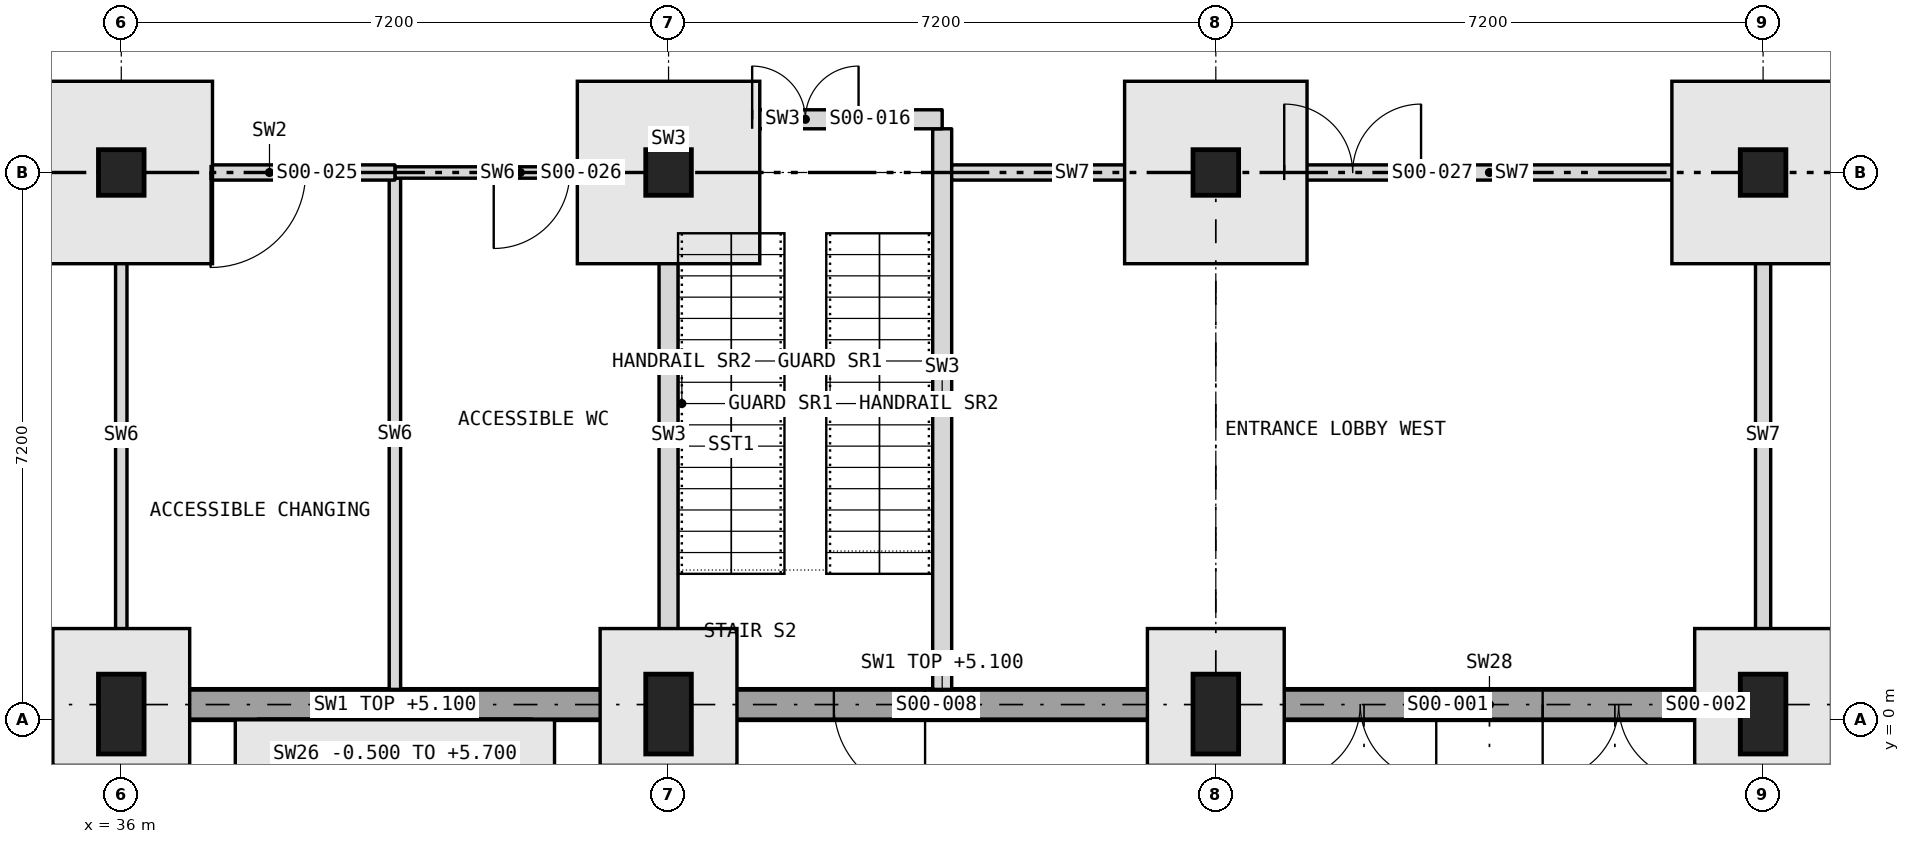
"""IFC4 building model, lengths in metres.
Left out: names, types, materials, properties, quantities, classifications, styles, units other than length and angle.
Written with IfcOpenShell. Run it as: python <this file> out.ifc"""

import sys

from ifc_helpers import new_model, si_unit, direction, frame, frame_2d, origin, origin_2d, place, context, subcontext, project, spatial, rectangle, extrude, element, fill, save


model = new_model("IFC4")
c1 = context("Model", 3, precision=1e-05, world=origin(), true_north=direction((0.0, 1.0)))
c2 = subcontext(c1, "Body", "Model", "MODEL_VIEW")
j1 = project(units=[si_unit("LENGTHUNIT", "METRE"), si_unit("PLANEANGLEUNIT", "RADIAN")], contexts=[c1])
p1 = place(None, origin())
s1 = spatial("IfcSite", under=j1, at=p1, CompositionType="ELEMENT")
p2 = place(p1, origin())
s2 = spatial("IfcBuilding", under=s1, at=p2, CompositionType="ELEMENT")
p3 = place(p2, origin())
s3 = spatial("IfcBuildingStorey", under=s2, at=p3, CompositionType="ELEMENT", Elevation=0.0)
p4 = place(p3, frame((36.0, 0.075, -0.45), z_axis=(0.0, 0.0, 1.0), x_axis=(1.0, 0.0, 0.0)))
e1 = element("IfcColumn", 1, at=p4, inside=s3, PredefinedType="COLUMN", context=c2, shape_type="SweptSolid", body=[
    extrude(rectangle(XDim=0.6, YDim=1.05, at=origin_2d()), origin(), (0.0, 0.0, 1.0), 6.45),
])
p5 = place(p3, frame((36.0, 7.2, -0.405), z_axis=(0.0, 0.0, 1.0), x_axis=(1.0, 0.0, 0.0)))
e2 = element("IfcColumn", 2, at=p5, inside=s3, PredefinedType="COLUMN", context=c2, shape_type="SweptSolid", body=[
    extrude(rectangle(XDim=0.6, YDim=0.6, at=origin_2d()), origin(), (0.0, 0.0, 1.0), 6.405),
])
p6 = place(p3, frame((43.2, 0.075, -0.45), z_axis=(0.0, 0.0, 1.0), x_axis=(1.0, 0.0, 0.0)))
e3 = element("IfcColumn", 3, at=p6, inside=s3, PredefinedType="COLUMN", context=c2, shape_type="SweptSolid", body=[
    extrude(rectangle(XDim=0.6, YDim=1.05, at=origin_2d()), origin(), (0.0, 0.0, 1.0), 6.45),
])
p7 = place(p3, frame((43.2, 7.2, -0.405), z_axis=(0.0, 0.0, 1.0), x_axis=(1.0, 0.0, 0.0)))
e4 = element("IfcColumn", 4, at=p7, inside=s3, PredefinedType="COLUMN", context=c2, shape_type="SweptSolid", body=[
    extrude(rectangle(XDim=0.6, YDim=0.6, at=origin_2d()), origin(), (0.0, 0.0, 1.0), 6.405),
])
p8 = place(p3, frame((50.4, 0.075, -0.45), z_axis=(0.0, 0.0, 1.0), x_axis=(1.0, 0.0, 0.0)))
e5 = element("IfcColumn", 5, at=p8, inside=s3, PredefinedType="COLUMN", context=c2, shape_type="SweptSolid", body=[
    extrude(rectangle(XDim=0.6, YDim=1.05, at=origin_2d()), origin(), (0.0, 0.0, 1.0), 6.45),
])
p9 = place(p3, frame((50.4, 7.2, -0.405), z_axis=(0.0, 0.0, 1.0), x_axis=(1.0, 0.0, 0.0)))
e6 = element("IfcColumn", 6, at=p9, inside=s3, PredefinedType="COLUMN", context=c2, shape_type="SweptSolid", body=[
    extrude(rectangle(XDim=0.6, YDim=0.6, at=origin_2d()), origin(), (0.0, 0.0, 1.0), 6.405),
])
p10 = place(p3, frame((57.6, 0.075, -0.45), z_axis=(0.0, 0.0, 1.0), x_axis=(1.0, 0.0, 0.0)))
e7 = element("IfcColumn", 7, at=p10, inside=s3, PredefinedType="COLUMN", context=c2, shape_type="SweptSolid", body=[
    extrude(rectangle(XDim=0.6, YDim=1.05, at=origin_2d()), origin(), (0.0, 0.0, 1.0), 6.45),
])
p11 = place(p3, frame((57.6, 7.2, -0.405), z_axis=(0.0, 0.0, 1.0), x_axis=(1.0, 0.0, 0.0)))
e8 = element("IfcColumn", 8, at=p11, inside=s3, PredefinedType="COLUMN", context=c2, shape_type="SweptSolid", body=[
    extrude(rectangle(XDim=0.6, YDim=0.6, at=origin_2d()), origin(), (0.0, 0.0, 1.0), 6.405),
])
p12 = place(p3, frame((29.1, 0.2, 0.0), z_axis=(0.0, 0.0, 1.0), x_axis=(1.0, 0.0, 0.0)))
e9 = element("IfcWall", 9, at=p12, inside=s3, PredefinedType="SOLIDWALL", context=c2, shape_type="SweptSolid", body=[
    extrude(rectangle(XDim=6.6, YDim=0.4, at=frame_2d((3.3, 0.0))), origin(), (0.0, 0.0, 1.0), 5.1),
])
p13 = place(p12, frame((1.9, 0.0, 2.4)))
e10 = element("IfcOpeningElement", 10, at=p13, cuts=e9, PredefinedType="OPENING", context=c2, shape_type="SweptSolid", body=[
    extrude(rectangle(XDim=1.1, YDim=1.2, at=frame_2d((0.55, 0.6))), frame((0.0, 0.21, 0.0), z_axis=(0.0, -1.0, 0.0), x_axis=(1.0, 0.0, 0.0)), (0.0, 0.0, 1.0), 0.42),
])
p14 = place(p12, frame((3.6, 0.0, 2.4)))
e11 = element("IfcOpeningElement", 11, at=p14, cuts=e9, PredefinedType="OPENING", context=c2, shape_type="SweptSolid", body=[
    extrude(rectangle(XDim=1.1, YDim=1.2, at=frame_2d((0.55, 0.6))), frame((0.0, 0.21, 0.0), z_axis=(0.0, -1.0, 0.0), x_axis=(1.0, 0.0, 0.0)), (0.0, 0.0, 1.0), 0.42),
])
p15 = place(p3, frame((36.3, 0.2, 0.0), z_axis=(0.0, 0.0, 1.0), x_axis=(1.0, 0.0, 0.0)))
e12 = element("IfcWall", 12, at=p15, inside=s3, PredefinedType="SOLIDWALL", context=c2, shape_type="SweptSolid", body=[
    extrude(rectangle(XDim=6.6, YDim=0.4, at=frame_2d((3.3, 0.0))), origin(), (0.0, 0.0, 1.0), 5.1),
])
p16 = place(p3, frame((43.5, 0.2, 0.0), z_axis=(0.0, 0.0, 1.0), x_axis=(1.0, 0.0, 0.0)))
e13 = element("IfcWall", 13, at=p16, inside=s3, PredefinedType="SOLIDWALL", context=c2, shape_type="SweptSolid", body=[
    extrude(rectangle(XDim=6.6, YDim=0.4, at=frame_2d((3.3, 0.0))), origin(), (0.0, 0.0, 1.0), 5.1),
])
p17 = place(p16, frame((1.875, 0.0, 0.0)))
e14 = element("IfcOpeningElement", 14, at=p17, cuts=e13, PredefinedType="OPENING", context=c2, shape_type="SweptSolid", body=[
    extrude(rectangle(XDim=1.2, YDim=2.1, at=frame_2d((0.6, 1.05))), frame((0.0, 0.21, 0.0), z_axis=(0.0, -1.0, 0.0), x_axis=(1.0, 0.0, 0.0)), (0.0, 0.0, 1.0), 0.42),
])
p18 = place(p3, frame((50.7, 0.2, 0.0), z_axis=(0.0, 0.0, 1.0), x_axis=(1.0, 0.0, 0.0)))
e15 = element("IfcWall", 15, at=p18, inside=s3, PredefinedType="SOLIDWALL", context=c2, shape_type="SweptSolid", body=[
    extrude(rectangle(XDim=6.6, YDim=0.4, at=frame_2d((3.3, 0.0))), origin(), (0.0, 0.0, 1.0), 5.7),
])
p19 = place(p18, frame((0.6, 0.0, 0.0)))
e16 = element("IfcOpeningElement", 16, at=p19, cuts=e15, PredefinedType="OPENING", context=c2, shape_type="SweptSolid", body=[
    extrude(rectangle(XDim=2.0, YDim=2.4, at=frame_2d((1.0, 1.2))), frame((0.0, 0.21, 0.0), z_axis=(0.0, -1.0, 0.0), x_axis=(1.0, 0.0, 0.0)), (0.0, 0.0, 1.0), 0.42),
])
p20 = place(p18, frame((4.0, 0.0, 0.0)))
e17 = element("IfcOpeningElement", 17, at=p20, cuts=e15, PredefinedType="OPENING", context=c2, shape_type="SweptSolid", body=[
    extrude(rectangle(XDim=2.0, YDim=2.4, at=frame_2d((1.0, 1.2))), frame((0.0, 0.21, 0.0), z_axis=(0.0, -1.0, 0.0), x_axis=(1.0, 0.0, 0.0)), (0.0, 0.0, 1.0), 0.42),
])
p21 = place(p3, frame((57.9, 0.2, 0.0), z_axis=(0.0, 0.0, 1.0), x_axis=(1.0, 0.0, 0.0)))
e18 = element("IfcWall", 18, at=p21, inside=s3, PredefinedType="SOLIDWALL", context=c2, shape_type="SweptSolid", body=[
    extrude(rectangle(XDim=6.6, YDim=0.4, at=frame_2d((3.3, 0.0))), origin(), (0.0, 0.0, 1.0), 5.7),
])
p22 = place(p21, frame((1.9, 0.0, 2.4)))
e19 = element("IfcOpeningElement", 19, at=p22, cuts=e18, PredefinedType="OPENING", context=c2, shape_type="SweptSolid", body=[
    extrude(rectangle(XDim=1.1, YDim=1.2, at=frame_2d((0.55, 0.6))), frame((0.0, 0.21, 0.0), z_axis=(0.0, -1.0, 0.0), x_axis=(1.0, 0.0, 0.0)), (0.0, 0.0, 1.0), 0.42),
])
p23 = place(p21, frame((3.6, 0.0, 2.4)))
e20 = element("IfcOpeningElement", 20, at=p23, cuts=e18, PredefinedType="OPENING", context=c2, shape_type="SweptSolid", body=[
    extrude(rectangle(XDim=1.1, YDim=1.2, at=frame_2d((0.55, 0.6))), frame((0.0, 0.21, 0.0), z_axis=(0.0, -1.0, 0.0), x_axis=(1.0, 0.0, 0.0)), (0.0, 0.0, 1.0), 0.42),
])
p24 = place(p3, frame((37.8, -0.45, -0.5), z_axis=(0.0, 0.0, 1.0), x_axis=(1.0, 0.0, 0.0)))
e21 = element("IfcWall", 21, at=p24, inside=s3, PredefinedType="SOLIDWALL", context=c2, shape_type="SweptSolid", body=[
    extrude(rectangle(XDim=3.6, YDim=0.9, at=frame_2d((1.8, 0.0))), origin(), (0.0, 0.0, 1.0), 6.2),
])
p25 = place(p3, frame((36.0, 0.6, 0.0), z_axis=(0.0, 0.0, 1.0), x_axis=(0.0, 1.0, 0.0)))
e22 = element("IfcWall", 22, at=p25, inside=s3, PredefinedType="PARTITIONING", context=c2, shape_type="SweptSolid", body=[
    extrude(rectangle(XDim=6.3, YDim=0.15, at=frame_2d((3.15, 0.0))), origin(), (0.0, 0.0, 1.0), 5.7),
])
p26 = place(p3, frame((39.6, 0.4, 0.0), z_axis=(0.0, 0.0, 1.0), x_axis=(0.0, 1.0, 0.0)))
e23 = element("IfcWall", 23, at=p26, inside=s3, PredefinedType="PARTITIONING", context=c2, shape_type="SweptSolid", body=[
    extrude(rectangle(XDim=6.725, YDim=0.15, at=frame_2d((3.363, 0.0))), origin(), (0.0, 0.0, 1.0), 5.7),
])
p27 = place(p3, frame((43.2, 0.6, 0.0), z_axis=(0.0, 0.0, 1.0), x_axis=(0.0, 1.0, 0.0)))
e24 = element("IfcWall", 24, at=p27, inside=s3, PredefinedType="SOLIDWALL", context=c2, shape_type="SweptSolid", body=[
    extrude(rectangle(XDim=6.3, YDim=0.25, at=frame_2d((3.15, 0.0))), origin(), (0.0, 0.0, 1.0), 5.7),
])
p28 = place(p3, frame((43.2, 7.5, 0.0), z_axis=(0.0, 0.0, 1.0), x_axis=(0.0, 1.0, 0.0)))
e25 = element("IfcWall", 25, at=p28, inside=s3, PredefinedType="SOLIDWALL", context=c2, shape_type="SweptSolid", body=[
    extrude(rectangle(XDim=0.275, YDim=0.25, at=frame_2d((0.137, 0.0))), origin(), (0.0, 0.0, 1.0), 5.7),
])
p29 = place(p3, frame((46.8, 0.4, 0.0), z_axis=(0.0, 0.0, 1.0), x_axis=(0.0, 1.0, 0.0)))
e26 = element("IfcWall", 26, at=p29, inside=s3, PredefinedType="SOLIDWALL", context=c2, shape_type="SweptSolid", body=[
    extrude(rectangle(XDim=7.375, YDim=0.25, at=frame_2d((3.688, 0.0))), origin(), (0.0, 0.0, 1.0), 5.7),
])
p30 = place(p3, frame((57.6, 0.6, 0.0), z_axis=(0.0, 0.0, 1.0), x_axis=(0.0, 1.0, 0.0)))
e27 = element("IfcWall", 27, at=p30, inside=s3, PredefinedType="PARTITIONING", context=c2, shape_type="SweptSolid", body=[
    extrude(rectangle(XDim=6.3, YDim=0.2, at=frame_2d((3.15, 0.0))), origin(), (0.0, 0.0, 1.0), 5.7),
])
p31 = place(p3, frame((46.925, 7.2, 0.0), z_axis=(0.0, 0.0, 1.0), x_axis=(1.0, 0.0, 0.0)))
e28 = element("IfcWall", 28, at=p31, inside=s3, PredefinedType="PARTITIONING", context=c2, shape_type="SweptSolid", body=[
    extrude(rectangle(XDim=3.175, YDim=0.2, at=frame_2d((1.587, 0.0))), origin(), (0.0, 0.0, 1.0), 5.7),
])
p32 = place(p3, frame((50.7, 7.2, 0.0), z_axis=(0.0, 0.0, 1.0), x_axis=(1.0, 0.0, 0.0)))
e29 = element("IfcWall", 29, at=p32, inside=s3, PredefinedType="PARTITIONING", context=c2, shape_type="SweptSolid", body=[
    extrude(rectangle(XDim=6.6, YDim=0.2, at=frame_2d((3.3, 0.0))), origin(), (0.0, 0.0, 1.0), 5.7),
])
p33 = place(p32, frame((0.6, 0.0, 0.0)))
e30 = element("IfcOpeningElement", 30, at=p33, cuts=e29, PredefinedType="OPENING", context=c2, shape_type="SweptSolid", body=[
    extrude(rectangle(XDim=1.8, YDim=2.1, at=frame_2d((0.9, 1.05))), frame((0.0, 0.11, 0.0), z_axis=(0.0, -1.0, 0.0), x_axis=(1.0, 0.0, 0.0)), (0.0, 0.0, 1.0), 0.22),
])
p34 = place(p3, frame((57.9, 7.2, 0.0), z_axis=(0.0, 0.0, 1.0), x_axis=(1.0, 0.0, 0.0)))
e31 = element("IfcWall", 31, at=p34, inside=s3, PredefinedType="PARTITIONING", context=c2, shape_type="SweptSolid", body=[
    extrude(rectangle(XDim=6.6, YDim=0.16, at=frame_2d((3.3, 0.0))), origin(), (0.0, 0.0, 1.0), 5.7),
])
p35 = place(p34, frame((2.8, 0.0, 0.0)))
e32 = element("IfcOpeningElement", 32, at=p35, cuts=e31, PredefinedType="OPENING", context=c2, shape_type="SweptSolid", body=[
    extrude(rectangle(XDim=1.0, YDim=2.1, at=frame_2d((0.5, 1.05))), frame((0.0, 0.09, 0.0), z_axis=(0.0, -1.0, 0.0), x_axis=(1.0, 0.0, 0.0)), (0.0, 0.0, 1.0), 0.18),
])
p36 = place(p3, frame((29.1, 7.2, 0.0), z_axis=(0.0, 0.0, 1.0), x_axis=(1.0, 0.0, 0.0)))
e33 = element("IfcWall", 33, at=p36, inside=s3, PredefinedType="PARTITIONING", context=c2, shape_type="SweptSolid", body=[
    extrude(rectangle(XDim=6.6, YDim=0.15, at=frame_2d((3.3, 0.0))), origin(), (0.0, 0.0, 1.0), 5.7),
])
p37 = place(p36, frame((1.05, 0.0, 0.0)))
e34 = element("IfcOpeningElement", 34, at=p37, cuts=e33, PredefinedType="OPENING", context=c2, shape_type="SweptSolid", body=[
    extrude(rectangle(XDim=0.9, YDim=2.1, at=frame_2d((0.45, 1.05))), frame((0.0, 0.085, 0.0), z_axis=(0.0, -1.0, 0.0), x_axis=(1.0, 0.0, 0.0)), (0.0, 0.0, 1.0), 0.17),
])
p38 = place(p3, frame((39.6, 7.2, 0.0), z_axis=(0.0, 0.0, 1.0), x_axis=(1.0, 0.0, 0.0)))
e35 = element("IfcWall", 35, at=p38, inside=s3, PredefinedType="PARTITIONING", context=c2, shape_type="SweptSolid", body=[
    extrude(rectangle(XDim=3.3, YDim=0.15, at=frame_2d((1.65, 0.0))), origin(), (0.0, 0.0, 1.0), 5.7),
])
p39 = place(p38, frame((1.3, 0.0, 0.0)))
e36 = element("IfcOpeningElement", 36, at=p39, cuts=e35, PredefinedType="OPENING", context=c2, shape_type="SweptSolid", body=[
    extrude(rectangle(XDim=1.0, YDim=2.1, at=frame_2d((0.5, 1.05))), frame((0.0, 0.085, 0.0), z_axis=(0.0, -1.0, 0.0), x_axis=(1.0, 0.0, 0.0)), (0.0, 0.0, 1.0), 0.17),
])
p40 = place(p3, frame((36.3, 7.2, 0.0), z_axis=(0.0, 0.0, 1.0), x_axis=(1.0, 0.0, 0.0)))
e37 = element("IfcWall", 37, at=p40, inside=s3, PredefinedType="PARTITIONING", context=c2, shape_type="SweptSolid", body=[
    extrude(rectangle(XDim=3.3, YDim=0.2, at=frame_2d((1.65, 0.0))), origin(), (0.0, 0.0, 1.0), 5.7),
])
p41 = place(p40, frame((0.875, 0.0, 0.0)))
e38 = element("IfcOpeningElement", 38, at=p41, cuts=e37, PredefinedType="OPENING", context=c2, shape_type="SweptSolid", body=[
    extrude(rectangle(XDim=1.25, YDim=2.1, at=frame_2d((0.625, 1.05))), frame((0.0, 0.11, 0.0), z_axis=(0.0, -1.0, 0.0), x_axis=(1.0, 0.0, 0.0)), (0.0, 0.0, 1.0), 0.22),
])
p42 = place(p3, frame((43.2, 7.9, 0.0), z_axis=(0.0, 0.0, 1.0), x_axis=(1.0, 0.0, 0.0)))
e39 = element("IfcWall", 39, at=p42, inside=s3, PredefinedType="SOLIDWALL", context=c2, shape_type="SweptSolid", body=[
    extrude(rectangle(XDim=3.6, YDim=0.25, at=frame_2d((1.8, 0.0))), origin(), (0.0, 0.0, 1.0), 5.7),
])
p43 = place(p42, frame((1.1, 0.0, 0.0)))
e40 = element("IfcOpeningElement", 40, at=p43, cuts=e39, PredefinedType="OPENING", context=c2, shape_type="SweptSolid", body=[
    extrude(rectangle(XDim=1.4, YDim=2.1, at=frame_2d((0.7, 1.05))), frame((0.0, 0.135, 0.0), z_axis=(0.0, -1.0, 0.0), x_axis=(1.0, 0.0, 0.0)), (0.0, 0.0, 1.0), 0.27),
])
p44 = place(p19, frame((2.0, 0.0, 0.0), z_axis=(0.0, 0.0, 1.0), x_axis=(-1.0, 0.0, 0.0)))
e41 = element("IfcDoor", 41, at=p44, inside=s3, OperationType="DOUBLE_DOOR_SINGLE_SWING", PredefinedType="DOOR", context=c2, shape_type="SweptSolid", body=[
    extrude(rectangle(XDim=2.0, YDim=2.4, at=frame_2d((1.0, 1.2))), frame((0.0, 0.025, 0.0), z_axis=(0.0, -1.0, 0.0), x_axis=(1.0, 0.0, 0.0)), (0.0, 0.0, 1.0), 0.05),
])
fill(e16, e41)
p45 = place(p20, frame((2.0, 0.0, 0.0), z_axis=(0.0, 0.0, 1.0), x_axis=(-1.0, 0.0, 0.0)))
e42 = element("IfcDoor", 42, at=p45, inside=s3, OperationType="DOUBLE_DOOR_SINGLE_SWING", PredefinedType="DOOR", context=c2, shape_type="SweptSolid", body=[
    extrude(rectangle(XDim=2.0, YDim=2.4, at=frame_2d((1.0, 1.2))), frame((0.0, 0.025, 0.0), z_axis=(0.0, -1.0, 0.0), x_axis=(1.0, 0.0, 0.0)), (0.0, 0.0, 1.0), 0.05),
])
fill(e17, e42)
p46 = place(p17, frame((1.2, 0.0, 0.0), z_axis=(0.0, 0.0, 1.0), x_axis=(-1.0, 0.0, 0.0)))
e43 = element("IfcDoor", 43, at=p46, inside=s3, OperationType="SINGLE_SWING_LEFT", PredefinedType="DOOR", context=c2, shape_type="SweptSolid", body=[
    extrude(rectangle(XDim=1.2, YDim=2.1, at=frame_2d((0.6, 1.05))), frame((0.0, 0.025, 0.0), z_axis=(0.0, -1.0, 0.0), x_axis=(1.0, 0.0, 0.0)), (0.0, 0.0, 1.0), 0.05),
])
fill(e14, e43)
p47 = place(p43, origin())
e44 = element("IfcDoor", 44, at=p47, inside=s3, OperationType="DOUBLE_DOOR_SINGLE_SWING", PredefinedType="DOOR", context=c2, shape_type="SweptSolid", body=[
    extrude(rectangle(XDim=1.4, YDim=2.1, at=frame_2d((0.7, 1.05))), frame((0.0, 0.025, 0.0), z_axis=(0.0, -1.0, 0.0), x_axis=(1.0, 0.0, 0.0)), (0.0, 0.0, 1.0), 0.05),
])
fill(e40, e44)
p48 = place(p41, frame((1.25, 0.0, 0.0), z_axis=(0.0, 0.0, 1.0), x_axis=(-1.0, 0.0, 0.0)))
e45 = element("IfcDoor", 45, at=p48, inside=s3, OperationType="SINGLE_SWING_RIGHT", PredefinedType="DOOR", context=c2, shape_type="SweptSolid", body=[
    extrude(rectangle(XDim=1.25, YDim=2.1, at=frame_2d((0.625, 1.05))), frame((0.0, 0.025, 0.0), z_axis=(0.0, -1.0, 0.0), x_axis=(1.0, 0.0, 0.0)), (0.0, 0.0, 1.0), 0.05),
])
fill(e38, e45)
p49 = place(p39, frame((1.0, 0.0, 0.0), z_axis=(0.0, 0.0, 1.0), x_axis=(-1.0, 0.0, 0.0)))
e46 = element("IfcDoor", 46, at=p49, inside=s3, OperationType="SINGLE_SWING_RIGHT", PredefinedType="DOOR", context=c2, shape_type="SweptSolid", body=[
    extrude(rectangle(XDim=1.0, YDim=2.1, at=frame_2d((0.5, 1.05))), frame((0.0, 0.025, 0.0), z_axis=(0.0, -1.0, 0.0), x_axis=(1.0, 0.0, 0.0)), (0.0, 0.0, 1.0), 0.05),
])
fill(e36, e46)
p50 = place(p33, origin())
e47 = element("IfcDoor", 47, at=p50, inside=s3, OperationType="DOUBLE_DOOR_SINGLE_SWING", PredefinedType="DOOR", context=c2, shape_type="SweptSolid", body=[
    extrude(rectangle(XDim=1.8, YDim=2.1, at=frame_2d((0.9, 1.05))), frame((0.0, 0.025, 0.0), z_axis=(0.0, -1.0, 0.0), x_axis=(1.0, 0.0, 0.0)), (0.0, 0.0, 1.0), 0.05),
])
fill(e30, e47)
save(model, sys.argv[1])
